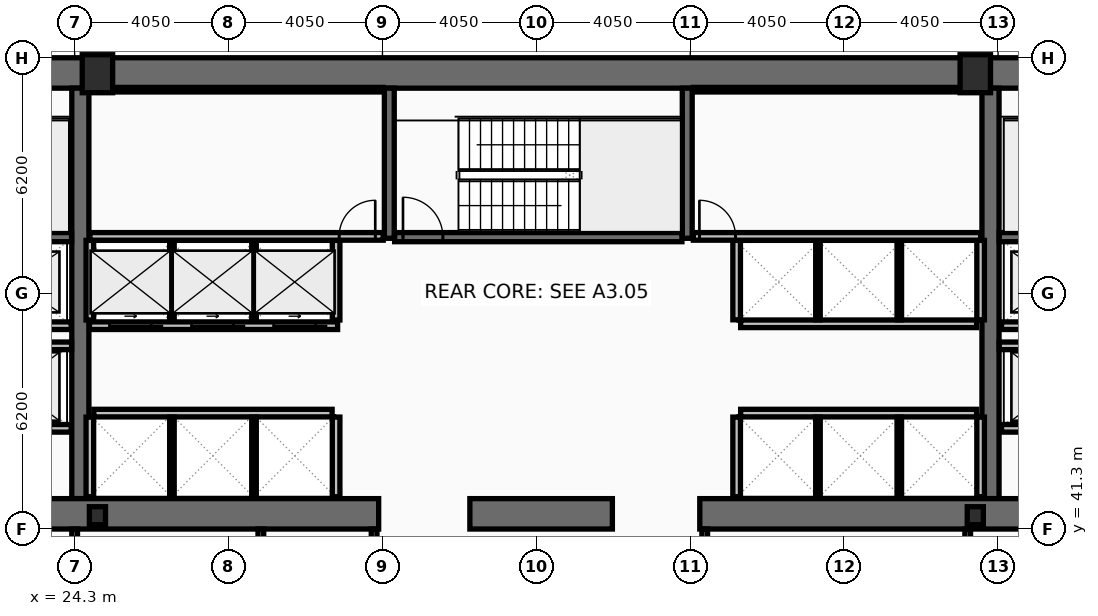
"""IFC4 building model, lengths in metres.
Left out: names, types, materials, properties, quantities, classifications, styles, units other than length and angle.
Written with IfcOpenShell. Run it as: python <this file> out.ifc"""

import sys

from ifc_helpers import new_model, si_unit, direction, frame, frame_2d, origin, origin_2d, place, context, subcontext, project, spatial, rectangle, hollow_rectangle, i_section, extrude, element, fill, save


model = new_model("IFC4")
c1 = context("Model", 3, precision=1e-05, world=origin(), true_north=direction((0.0, 1.0)))
c2 = subcontext(c1, "Body", "Model", "MODEL_VIEW")
j1 = project(units=[si_unit("LENGTHUNIT", "METRE"), si_unit("PLANEANGLEUNIT", "RADIAN")], contexts=[c1])
p1 = place(None, origin())
s1 = spatial("IfcSite", under=j1, at=p1, CompositionType="ELEMENT")
p2 = place(p1, origin())
s2 = spatial("IfcBuilding", under=s1, at=p2, CompositionType="ELEMENT")
p3 = place(p2, frame((0.0, 0.0, 61.8)))
s3 = spatial("IfcBuildingStorey", under=s2, at=p3, CompositionType="ELEMENT", Elevation=61.8)
p4 = place(p3, frame((16.2, 53.3, 0.0), z_axis=(0.0, 0.0, 1.0), x_axis=(1.0, 0.0, 0.0)))
e1 = element("IfcWall", 1, at=p4, inside=s3, PredefinedType="SHEAR", context=c2, shape_type="SweptSolid", body=[
    extrude(rectangle(XDim=40.5, YDim=0.8, at=frame_2d((20.25, 0.0))), origin(), (0.0, 0.0, 1.0), 3.82),
])
for number, where, z_axis, x_axis in (
    (2, (24.45, 42.1, 0.0), (0.0, 0.0, 1.0), (0.0, 1.0, 0.0)),
    (3, (48.4, 42.1, 0.0), (0.0, 0.0, 1.0), (0.0, 1.0, 0.0)),
):
    element("IfcWall", number, at=place(p3, frame(where, z_axis=z_axis, x_axis=x_axis)), inside=s3, PredefinedType="SHEAR", context=c2, shape_type="SweptSolid", body=[
        extrude(rectangle(XDim=10.8, YDim=0.45, at=frame_2d((5.4, 0.0))), origin(), (0.0, 0.0, 1.0), 3.82),
    ])
p5 = place(p3, frame((32.3, 41.7, 0.0), z_axis=(0.0, 0.0, 1.0), x_axis=(-1.0, 0.0, 0.0)))
e4 = element("IfcWall", 4, at=p5, inside=s3, PredefinedType="SHEAR", context=c2, shape_type="SweptSolid", body=[
    extrude(rectangle(XDim=11.45, YDim=0.8, at=frame_2d((5.725, 0.0))), origin(), (0.0, 0.0, 1.0), 3.82),
])
p6 = place(p3, frame((38.45, 41.7, 0.0), z_axis=(0.0, 0.0, 1.0), x_axis=(-1.0, 0.0, 0.0)))
e5 = element("IfcWall", 5, at=p6, inside=s3, PredefinedType="SHEAR", context=c2, shape_type="SweptSolid", body=[
    extrude(rectangle(XDim=3.75, YDim=0.8, at=frame_2d((1.875, 0.0))), origin(), (0.0, 0.0, 1.0), 3.82),
])
p7 = place(p3, frame((52.05, 41.7, 0.0), z_axis=(0.0, 0.0, 1.0), x_axis=(-1.0, 0.0, 0.0)))
e6 = element("IfcWall", 6, at=p7, inside=s3, PredefinedType="SHEAR", context=c2, shape_type="SweptSolid", body=[
    extrude(rectangle(XDim=11.3, YDim=0.8, at=frame_2d((5.65, 0.0))), origin(), (0.0, 0.0, 1.0), 3.82),
])
for number, where, z_axis, x_axis in (
    (7, (32.58, 48.95, 0.0), (0.0, 0.0, 1.0), (0.0, 1.0, 0.0)),
    (8, (40.42, 48.95, 0.0), (0.0, 0.0, 1.0), (0.0, 1.0, 0.0)),
):
    element("IfcWall", number, at=place(p3, frame(where, z_axis=z_axis, x_axis=x_axis)), inside=s3, PredefinedType="SHEAR", context=c2, shape_type="SweptSolid", body=[
        extrude(rectangle(XDim=3.95, YDim=0.26, at=frame_2d((1.975, 0.0))), origin(), (0.0, 0.0, 1.0), 3.82),
    ])
p8 = place(p3, frame((17.0, 48.98, 0.0), z_axis=(0.0, 0.0, 1.0), x_axis=(1.0, 0.0, 0.0)))
e9 = element("IfcWall", 9, at=p8, inside=s3, PredefinedType="SHEAR", context=c2, shape_type="SweptSolid", body=[
    extrude(rectangle(XDim=7.22, YDim=0.24, at=frame_2d((3.61, 0.0))), origin(), (0.0, 0.0, 1.0), 3.82),
])
p9 = place(p8, frame((0.22, 0.0, 0.0)))
e10 = element("IfcOpeningElement", 10, at=p9, cuts=e9, PredefinedType="OPENING", context=c2, shape_type="SweptSolid", body=[
    extrude(rectangle(XDim=1.05, YDim=2.15, at=frame_2d((0.525, 1.075))), frame((0.0, 0.13, 0.0), z_axis=(0.0, -1.0, 0.0), x_axis=(1.0, 0.0, 0.0)), (0.0, 0.0, 1.0), 0.26),
])
p10 = place(p3, frame((48.63, 48.98, 0.0), z_axis=(0.0, 0.0, 1.0), x_axis=(1.0, 0.0, 0.0)))
e11 = element("IfcWall", 11, at=p10, inside=s3, PredefinedType="SHEAR", context=c2, shape_type="SweptSolid", body=[
    extrude(rectangle(XDim=7.27, YDim=0.24, at=frame_2d((3.635, 0.0))), origin(), (0.0, 0.0, 1.0), 3.82),
])
p11 = place(p10, frame((6.0, 0.0, 0.0)))
e12 = element("IfcOpeningElement", 12, at=p11, cuts=e11, PredefinedType="OPENING", context=c2, shape_type="SweptSolid", body=[
    extrude(rectangle(XDim=1.05, YDim=2.15, at=frame_2d((0.525, 1.075))), frame((0.0, 0.13, 0.0), z_axis=(0.0, -1.0, 0.0), x_axis=(1.0, 0.0, 0.0)), (0.0, 0.0, 1.0), 0.26),
])
p12 = place(p3, frame((32.72, 48.98, 0.0), z_axis=(0.0, 0.0, 1.0), x_axis=(1.0, 0.0, 0.0)))
e13 = element("IfcWall", 13, at=p12, inside=s3, PredefinedType="SHEAR", context=c2, shape_type="SweptSolid", body=[
    extrude(rectangle(XDim=7.56, YDim=0.24, at=frame_2d((3.78, 0.0))), origin(), (0.0, 0.0, 1.0), 3.82),
])
p13 = place(p12, frame((0.22, 0.0, 0.0)))
e14 = element("IfcOpeningElement", 14, at=p13, cuts=e13, PredefinedType="OPENING", context=c2, shape_type="SweptSolid", body=[
    extrude(rectangle(XDim=1.05, YDim=2.15, at=frame_2d((0.525, 1.075))), frame((0.0, 0.13, 0.0), z_axis=(0.0, -1.0, 0.0), x_axis=(1.0, 0.0, 0.0)), (0.0, 0.0, 1.0), 0.26),
])
for number, where, z_axis, x_axis in (
    (15, (24.9, 53.28, 0.0), (0.0, 0.0, 1.0), (1.0, 0.0, 0.0)),
    (16, (48.0, 53.28, 0.0), (0.0, 0.0, 1.0), (1.0, 0.0, 0.0)),
):
    element("IfcColumn", number, at=place(p3, frame(where, z_axis=z_axis, x_axis=x_axis)), inside=s3, PredefinedType="COLUMN", context=c2, shape_type="SweptSolid", body=[
        extrude(hollow_rectangle(XDim=0.8, YDim=1.0, WallThickness=0.055, at=origin_2d()), origin(), (0.0, 0.0, 1.0), 4.0),
    ])
for number, where, z_axis, x_axis in (
    (17, (24.9, 41.65, 0.0), (0.0, 0.0, 1.0), (1.0, 0.0, 0.0)),
    (18, (48.0, 41.65, 0.0), (0.0, 0.0, 1.0), (1.0, 0.0, 0.0)),
):
    element("IfcColumn", number, at=place(p3, frame(where, z_axis=z_axis, x_axis=x_axis)), inside=s3, PredefinedType="COLUMN", context=c2, shape_type="SweptSolid", body=[
        extrude(i_section(OverallWidth=0.424, OverallDepth=0.474, WebThickness=0.048, FlangeThickness=0.077, at=origin_2d()), origin(), (0.0, 0.0, 1.0), 4.0),
    ])
p14 = place(p3, frame((51.61, 43.95, 0.0), z_axis=(0.0, 0.0, 1.0), x_axis=(-1.0, 0.0, 0.0)))
e19 = element("IfcWall", 19, at=p14, inside=s3, PredefinedType="PARTITIONING", context=c2, shape_type="SweptSolid", body=[
    extrude(rectangle(XDim=2.92, YDim=0.2, at=frame_2d((1.46, 0.0))), origin(), (0.0, 0.0, 1.0), 3.82),
])
p15 = place(p14, frame((0.81, 0.0, 0.0)))
e20 = element("IfcOpeningElement", 20, at=p15, cuts=e19, PredefinedType="OPENING", context=c2, shape_type="SweptSolid", body=[
    extrude(rectangle(XDim=1.3, YDim=2.18, at=frame_2d((0.65, 1.09))), frame((0.0, 0.11, 0.0), z_axis=(0.0, -1.0, 0.0), x_axis=(1.0, 0.0, 0.0)), (0.0, 0.0, 1.0), 0.22),
])
p16 = place(p3, frame((24.21, 43.95, 0.0), z_axis=(0.0, 0.0, 1.0), x_axis=(-1.0, 0.0, 0.0)))
e21 = element("IfcWall", 21, at=p16, inside=s3, PredefinedType="PARTITIONING", context=c2, shape_type="SweptSolid", body=[
    extrude(rectangle(XDim=2.97, YDim=0.2, at=frame_2d((1.485, 0.0))), origin(), (0.0, 0.0, 1.0), 3.82),
])
p17 = place(p16, frame((0.86, 0.0, 0.0)))
e22 = element("IfcOpeningElement", 22, at=p17, cuts=e21, PredefinedType="OPENING", context=c2, shape_type="SweptSolid", body=[
    extrude(rectangle(XDim=1.3, YDim=2.18, at=frame_2d((0.65, 1.09))), frame((0.0, 0.11, 0.0), z_axis=(0.0, -1.0, 0.0), x_axis=(1.0, 0.0, 0.0)), (0.0, 0.0, 1.0), 0.22),
])
p18 = place(p3, frame((51.61, 46.65, 0.0), z_axis=(0.0, 0.0, 1.0), x_axis=(-1.0, 0.0, 0.0)))
e23 = element("IfcWall", 23, at=p18, inside=s3, PredefinedType="PARTITIONING", context=c2, shape_type="SweptSolid", body=[
    extrude(rectangle(XDim=2.92, YDim=0.2, at=frame_2d((1.46, 0.0))), origin(), (0.0, 0.0, 1.0), 3.82),
])
p19 = place(p18, frame((0.86, 0.0, 0.0)))
e24 = element("IfcOpeningElement", 24, at=p19, cuts=e23, PredefinedType="OPENING", context=c2, shape_type="SweptSolid", body=[
    extrude(rectangle(XDim=1.2, YDim=2.18, at=frame_2d((0.6, 1.09))), frame((0.0, 0.11, 0.0), z_axis=(0.0, -1.0, 0.0), x_axis=(1.0, 0.0, 0.0)), (0.0, 0.0, 1.0), 0.22),
])
p20 = place(p3, frame((24.21, 46.65, 0.0), z_axis=(0.0, 0.0, 1.0), x_axis=(-1.0, 0.0, 0.0)))
e25 = element("IfcWall", 25, at=p20, inside=s3, PredefinedType="PARTITIONING", context=c2, shape_type="SweptSolid", body=[
    extrude(rectangle(XDim=2.97, YDim=0.2, at=frame_2d((1.485, 0.0))), origin(), (0.0, 0.0, 1.0), 3.82),
])
p21 = place(p20, frame((0.91, 0.0, 0.0)))
e26 = element("IfcOpeningElement", 26, at=p21, cuts=e25, PredefinedType="OPENING", context=c2, shape_type="SweptSolid", body=[
    extrude(rectangle(XDim=1.2, YDim=2.18, at=frame_2d((0.6, 1.09))), frame((0.0, 0.11, 0.0), z_axis=(0.0, -1.0, 0.0), x_axis=(1.0, 0.0, 0.0)), (0.0, 0.0, 1.0), 0.22),
])
p22 = place(p3, frame((31.22, 46.65, 0.0), z_axis=(0.0, 0.0, 1.0), x_axis=(-1.0, 0.0, 0.0)))
e27 = element("IfcWall", 27, at=p22, inside=s3, PredefinedType="PARTITIONING", context=c2, shape_type="SweptSolid", body=[
    extrude(rectangle(XDim=6.53, YDim=0.2, at=frame_2d((3.265, 0.0))), origin(), (0.0, 0.0, 1.0), 3.82),
])
p23 = place(p22, frame((4.9, 0.0, 0.0)))
e28 = element("IfcOpeningElement", 28, at=p23, cuts=e27, PredefinedType="OPENING", context=c2, shape_type="SweptSolid", body=[
    extrude(rectangle(XDim=1.1, YDim=2.18, at=frame_2d((0.55, 1.09))), frame((0.0, 0.11, 0.0), z_axis=(0.0, -1.0, 0.0), x_axis=(1.0, 0.0, 0.0)), (0.0, 0.0, 1.0), 0.22),
])
p24 = place(p22, frame((2.74, 0.0, 0.0)))
e29 = element("IfcOpeningElement", 29, at=p24, cuts=e27, PredefinedType="OPENING", context=c2, shape_type="SweptSolid", body=[
    extrude(rectangle(XDim=1.1, YDim=2.18, at=frame_2d((0.55, 1.09))), frame((0.0, 0.11, 0.0), z_axis=(0.0, -1.0, 0.0), x_axis=(1.0, 0.0, 0.0)), (0.0, 0.0, 1.0), 0.22),
])
p25 = place(p22, frame((0.58, 0.0, 0.0)))
e30 = element("IfcOpeningElement", 30, at=p25, cuts=e27, PredefinedType="OPENING", context=c2, shape_type="SweptSolid", body=[
    extrude(rectangle(XDim=1.1, YDim=2.18, at=frame_2d((0.55, 1.09))), frame((0.0, 0.11, 0.0), z_axis=(0.0, -1.0, 0.0), x_axis=(1.0, 0.0, 0.0)), (0.0, 0.0, 1.0), 0.22),
])
p26 = place(p3, frame((21.2, 46.12, 0.0), z_axis=(0.0, 0.0, 1.0), x_axis=(1.0, 0.0, 0.0)))
e31 = element("IfcWall", 31, at=p26, inside=s3, PredefinedType="PARTITIONING", context=c2, shape_type="SweptSolid", body=[
    extrude(rectangle(XDim=3.02, YDim=0.2, at=frame_2d((1.51, 0.0))), origin(), (0.0, 0.0, 1.0), 3.82),
])
p27 = place(p3, frame((48.63, 46.12, 0.0), z_axis=(0.0, 0.0, 1.0), x_axis=(1.0, 0.0, 0.0)))
e32 = element("IfcWall", 32, at=p27, inside=s3, PredefinedType="PARTITIONING", context=c2, shape_type="SweptSolid", body=[
    extrude(rectangle(XDim=3.07, YDim=0.2, at=frame_2d((1.535, 0.0))), origin(), (0.0, 0.0, 1.0), 3.82),
])
for number, where, z_axis, x_axis in (
    (33, (24.7, 46.8, 0.0), (0.0, 0.0, 1.0), (0.0, 1.0, 0.0)),
    (34, (31.18, 46.8, 0.0), (0.0, 0.0, 1.0), (0.0, 1.0, 0.0)),
):
    element("IfcWall", number, at=place(p3, frame(where, z_axis=z_axis, x_axis=x_axis)), inside=s3, PredefinedType="PARTITIONING", context=c2, shape_type="SweptSolid", body=[
        extrude(rectangle(XDim=2.095, YDim=0.2, at=frame_2d((1.047, 0.0))), origin(), (0.0, 0.0, 1.0), 3.82),
    ])
for number, where, z_axis, x_axis in (
    (35, (26.86, 46.8, 0.0), (0.0, 0.0, 1.0), (0.0, 1.0, 0.0)),
    (36, (29.02, 46.8, 0.0), (0.0, 0.0, 1.0), (0.0, 1.0, 0.0)),
):
    element("IfcWall", number, at=place(p3, frame(where, z_axis=z_axis, x_axis=x_axis)), inside=s3, PredefinedType="PARTITIONING", context=c2, shape_type="SweptSolid", body=[
        extrude(rectangle(XDim=2.095, YDim=0.12, at=frame_2d((1.047, 0.0))), origin(), (0.0, 0.0, 1.0), 3.82),
    ])
p28 = place(p3, frame((24.805, 44.35, 0.0), z_axis=(0.0, 0.0, 1.0), x_axis=(1.0, 0.0, 0.0)))
e37 = element("IfcWall", 37, at=p28, inside=s3, PredefinedType="PARTITIONING", context=c2, shape_type="SweptSolid", body=[
    extrude(rectangle(XDim=6.27, YDim=0.2, at=frame_2d((3.135, 0.0))), origin(), (0.0, 0.0, 1.0), 3.82),
])
for number, where, z_axis, x_axis in (
    (38, (24.7, 42.15, 0.0), (0.0, 0.0, 1.0), (0.0, 1.0, 0.0)),
    (39, (31.18, 42.15, 0.0), (0.0, 0.0, 1.0), (0.0, 1.0, 0.0)),
):
    element("IfcWall", number, at=place(p3, frame(where, z_axis=z_axis, x_axis=x_axis)), inside=s3, PredefinedType="PARTITIONING", context=c2, shape_type="SweptSolid", body=[
        extrude(rectangle(XDim=2.095, YDim=0.2, at=frame_2d((1.048, 0.0))), origin(), (0.0, 0.0, 1.0), 3.82),
    ])
for number, where, z_axis, x_axis in (
    (40, (26.86, 42.15, 0.0), (0.0, 0.0, 1.0), (0.0, 1.0, 0.0)),
    (41, (29.02, 42.15, 0.0), (0.0, 0.0, 1.0), (0.0, 1.0, 0.0)),
):
    element("IfcWall", number, at=place(p3, frame(where, z_axis=z_axis, x_axis=x_axis)), inside=s3, PredefinedType="PARTITIONING", context=c2, shape_type="SweptSolid", body=[
        extrude(rectangle(XDim=2.095, YDim=0.12, at=frame_2d((1.048, 0.0))), origin(), (0.0, 0.0, 1.0), 3.82),
    ])
p29 = place(p3, frame((41.825, 46.7, 0.0), z_axis=(0.0, 0.0, 1.0), x_axis=(1.0, 0.0, 0.0)))
e42 = element("IfcWall", 42, at=p29, inside=s3, PredefinedType="PARTITIONING", context=c2, shape_type="SweptSolid", body=[
    extrude(rectangle(XDim=6.21, YDim=0.2, at=frame_2d((3.105, 0.0))), origin(), (0.0, 0.0, 1.0), 3.82),
])
for number, where, z_axis, x_axis in (
    (43, (41.72, 46.805, 0.0), (0.0, 0.0, 1.0), (0.0, 1.0, 0.0)),
    (44, (48.14, 46.805, 0.0), (0.0, 0.0, 1.0), (0.0, 1.0, 0.0)),
):
    element("IfcWall", number, at=place(p3, frame(where, z_axis=z_axis, x_axis=x_axis)), inside=s3, PredefinedType="PARTITIONING", context=c2, shape_type="SweptSolid", body=[
        extrude(rectangle(XDim=2.09, YDim=0.2, at=frame_2d((1.045, 0.0))), origin(), (0.0, 0.0, 1.0), 3.82),
    ])
for number, where, z_axis, x_axis in (
    (45, (43.86, 46.805, 0.0), (0.0, 0.0, 1.0), (0.0, 1.0, 0.0)),
    (46, (46.0, 46.805, 0.0), (0.0, 0.0, 1.0), (0.0, 1.0, 0.0)),
):
    element("IfcWall", number, at=place(p3, frame(where, z_axis=z_axis, x_axis=x_axis)), inside=s3, PredefinedType="PARTITIONING", context=c2, shape_type="SweptSolid", body=[
        extrude(rectangle(XDim=2.09, YDim=0.12, at=frame_2d((1.045, 0.0))), origin(), (0.0, 0.0, 1.0), 3.82),
    ])
p30 = place(p3, frame((41.825, 44.35, 0.0), z_axis=(0.0, 0.0, 1.0), x_axis=(1.0, 0.0, 0.0)))
e47 = element("IfcWall", 47, at=p30, inside=s3, PredefinedType="PARTITIONING", context=c2, shape_type="SweptSolid", body=[
    extrude(rectangle(XDim=6.21, YDim=0.2, at=frame_2d((3.105, 0.0))), origin(), (0.0, 0.0, 1.0), 3.82),
])
for number, where, z_axis, x_axis in (
    (48, (41.72, 42.15, 0.0), (0.0, 0.0, 1.0), (0.0, 1.0, 0.0)),
    (49, (48.14, 42.15, 0.0), (0.0, 0.0, 1.0), (0.0, 1.0, 0.0)),
):
    element("IfcWall", number, at=place(p3, frame(where, z_axis=z_axis, x_axis=x_axis)), inside=s3, PredefinedType="PARTITIONING", context=c2, shape_type="SweptSolid", body=[
        extrude(rectangle(XDim=2.095, YDim=0.2, at=frame_2d((1.048, 0.0))), origin(), (0.0, 0.0, 1.0), 3.82),
    ])
for number, where, z_axis, x_axis in (
    (50, (43.86, 42.15, 0.0), (0.0, 0.0, 1.0), (0.0, 1.0, 0.0)),
    (51, (46.0, 42.15, 0.0), (0.0, 0.0, 1.0), (0.0, 1.0, 0.0)),
):
    element("IfcWall", number, at=place(p3, frame(where, z_axis=z_axis, x_axis=x_axis)), inside=s3, PredefinedType="PARTITIONING", context=c2, shape_type="SweptSolid", body=[
        extrude(rectangle(XDim=2.095, YDim=0.12, at=frame_2d((1.048, 0.0))), origin(), (0.0, 0.0, 1.0), 3.82),
    ])
p31 = place(p3, frame((24.7, 52.86, 0.0), z_axis=(0.0, 0.0, 1.0), x_axis=(1.0, 0.0, 0.0)))
e52 = element("IfcWall", 52, at=p31, inside=s3, PredefinedType="PARTITIONING", context=c2, shape_type="SweptSolid", body=[
    extrude(rectangle(XDim=7.72, YDim=0.12, at=frame_2d((3.86, 0.0))), origin(), (0.0, 0.0, 1.0), 3.82),
])
p32 = place(p3, frame((24.7, 49.0, 0.0), z_axis=(0.0, 0.0, 1.0), x_axis=(1.0, 0.0, 0.0)))
e53 = element("IfcWall", 53, at=p32, inside=s3, PredefinedType="PARTITIONING", context=c2, shape_type="SweptSolid", body=[
    extrude(rectangle(XDim=7.72, YDim=0.2, at=frame_2d((3.86, 0.0))), origin(), (0.0, 0.0, 1.0), 3.82),
])
p33 = place(p32, frame((6.56, 0.0, 0.0)))
e54 = element("IfcOpeningElement", 54, at=p33, cuts=e53, PredefinedType="OPENING", context=c2, shape_type="SweptSolid", body=[
    extrude(rectangle(XDim=0.95, YDim=2.1, at=frame_2d((0.475, 1.05))), frame((0.0, 0.11, 0.0), z_axis=(0.0, -1.0, 0.0), x_axis=(1.0, 0.0, 0.0)), (0.0, 0.0, 1.0), 0.22),
])
p34 = place(p3, frame((40.58, 52.86, 0.0), z_axis=(0.0, 0.0, 1.0), x_axis=(1.0, 0.0, 0.0)))
e55 = element("IfcWall", 55, at=p34, inside=s3, PredefinedType="PARTITIONING", context=c2, shape_type="SweptSolid", body=[
    extrude(rectangle(XDim=7.56, YDim=0.12, at=frame_2d((3.78, 0.0))), origin(), (0.0, 0.0, 1.0), 3.82),
])
p35 = place(p3, frame((40.58, 49.0, 0.0), z_axis=(0.0, 0.0, 1.0), x_axis=(1.0, 0.0, 0.0)))
e56 = element("IfcWall", 56, at=p35, inside=s3, PredefinedType="PARTITIONING", context=c2, shape_type="SweptSolid", body=[
    extrude(rectangle(XDim=7.56, YDim=0.2, at=frame_2d((3.78, 0.0))), origin(), (0.0, 0.0, 1.0), 3.82),
])
p36 = place(p35, frame((0.16, 0.0, 0.0)))
e57 = element("IfcOpeningElement", 57, at=p36, cuts=e56, PredefinedType="OPENING", context=c2, shape_type="SweptSolid", body=[
    extrude(rectangle(XDim=0.95, YDim=2.1, at=frame_2d((0.475, 1.05))), frame((0.0, 0.11, 0.0), z_axis=(0.0, -1.0, 0.0), x_axis=(1.0, 0.0, 0.0)), (0.0, 0.0, 1.0), 0.22),
])
for number, where, z_axis, x_axis in (
    (58, (24.3, 38.28, 0.0), (0.0, 0.0, 1.0), (0.0, 1.0, 0.0)),
    (59, (29.2, 38.28, 0.0), (0.0, 0.0, 1.0), (0.0, 1.0, 0.0)),
    (60, (32.18, 38.28, 0.0), (0.0, 0.0, 1.0), (0.0, 1.0, 0.0)),
    (61, (40.88, 38.28, 0.0), (0.0, 0.0, 1.0), (0.0, 1.0, 0.0)),
):
    element("IfcWall", number, at=place(p3, frame(where, z_axis=z_axis, x_axis=x_axis)), inside=s3, PredefinedType="PARTITIONING", context=c2, shape_type="SweptSolid", body=[
        extrude(rectangle(XDim=3.02, YDim=0.15, at=frame_2d((1.51, 0.0))), origin(), (0.0, 0.0, 1.0), 3.82),
    ])
p37 = place(p3, frame((47.8, 38.28, 0.0), z_axis=(0.0, 0.0, 1.0), x_axis=(0.0, 1.0, 0.0)))
e62 = element("IfcWall", 62, at=p37, inside=s3, PredefinedType="PARTITIONING", context=c2, shape_type="SweptSolid", body=[
    extrude(rectangle(XDim=3.02, YDim=0.15, at=frame_2d((1.51, 0.0))), origin(), (0.0, 0.0, 1.0), 3.01),
])
p38 = place(p13, origin())
e63 = element("IfcDoor", 63, at=p38, inside=s3, OperationType="SINGLE_SWING_LEFT", PredefinedType="DOOR", context=c2, shape_type="SweptSolid", body=[
    extrude(rectangle(XDim=1.05, YDim=2.15, at=frame_2d((0.525, 1.075))), frame((0.0, 0.025, 0.0), z_axis=(0.0, -1.0, 0.0), x_axis=(1.0, 0.0, 0.0)), (0.0, 0.0, 1.0), 0.05),
])
fill(e14, e63)
p39 = place(p23, origin())
e64 = element("IfcDoor", 64, at=p39, inside=s3, OperationType="SLIDING_TO_LEFT", PredefinedType="DOOR", context=c2, shape_type="SweptSolid", body=[
    extrude(rectangle(XDim=1.1, YDim=2.18, at=frame_2d((0.55, 1.09))), frame((0.0, 0.025, 0.0), z_axis=(0.0, -1.0, 0.0), x_axis=(1.0, 0.0, 0.0)), (0.0, 0.0, 1.0), 0.05),
])
fill(e28, e64)
p40 = place(p24, origin())
e65 = element("IfcDoor", 65, at=p40, inside=s3, OperationType="SLIDING_TO_LEFT", PredefinedType="DOOR", context=c2, shape_type="SweptSolid", body=[
    extrude(rectangle(XDim=1.1, YDim=2.18, at=frame_2d((0.55, 1.09))), frame((0.0, 0.025, 0.0), z_axis=(0.0, -1.0, 0.0), x_axis=(1.0, 0.0, 0.0)), (0.0, 0.0, 1.0), 0.05),
])
fill(e29, e65)
p41 = place(p25, origin())
e66 = element("IfcDoor", 66, at=p41, inside=s3, OperationType="SLIDING_TO_LEFT", PredefinedType="DOOR", context=c2, shape_type="SweptSolid", body=[
    extrude(rectangle(XDim=1.1, YDim=2.18, at=frame_2d((0.55, 1.09))), frame((0.0, 0.025, 0.0), z_axis=(0.0, -1.0, 0.0), x_axis=(1.0, 0.0, 0.0)), (0.0, 0.0, 1.0), 0.05),
])
fill(e30, e66)
p42 = place(p33, origin())
e67 = element("IfcDoor", 67, at=p42, inside=s3, OperationType="SINGLE_SWING_RIGHT", PredefinedType="DOOR", context=c2, shape_type="SweptSolid", body=[
    extrude(rectangle(XDim=0.95, YDim=2.1, at=frame_2d((0.475, 1.05))), frame((0.0, 0.025, 0.0), z_axis=(0.0, -1.0, 0.0), x_axis=(1.0, 0.0, 0.0)), (0.0, 0.0, 1.0), 0.05),
])
fill(e54, e67)
p43 = place(p36, origin())
e68 = element("IfcDoor", 68, at=p43, inside=s3, OperationType="SINGLE_SWING_LEFT", PredefinedType="DOOR", context=c2, shape_type="SweptSolid", body=[
    extrude(rectangle(XDim=0.95, YDim=2.1, at=frame_2d((0.475, 1.05))), frame((0.0, 0.025, 0.0), z_axis=(0.0, -1.0, 0.0), x_axis=(1.0, 0.0, 0.0)), (0.0, 0.0, 1.0), 0.05),
])
fill(e57, e68)
save(model, sys.argv[1])
